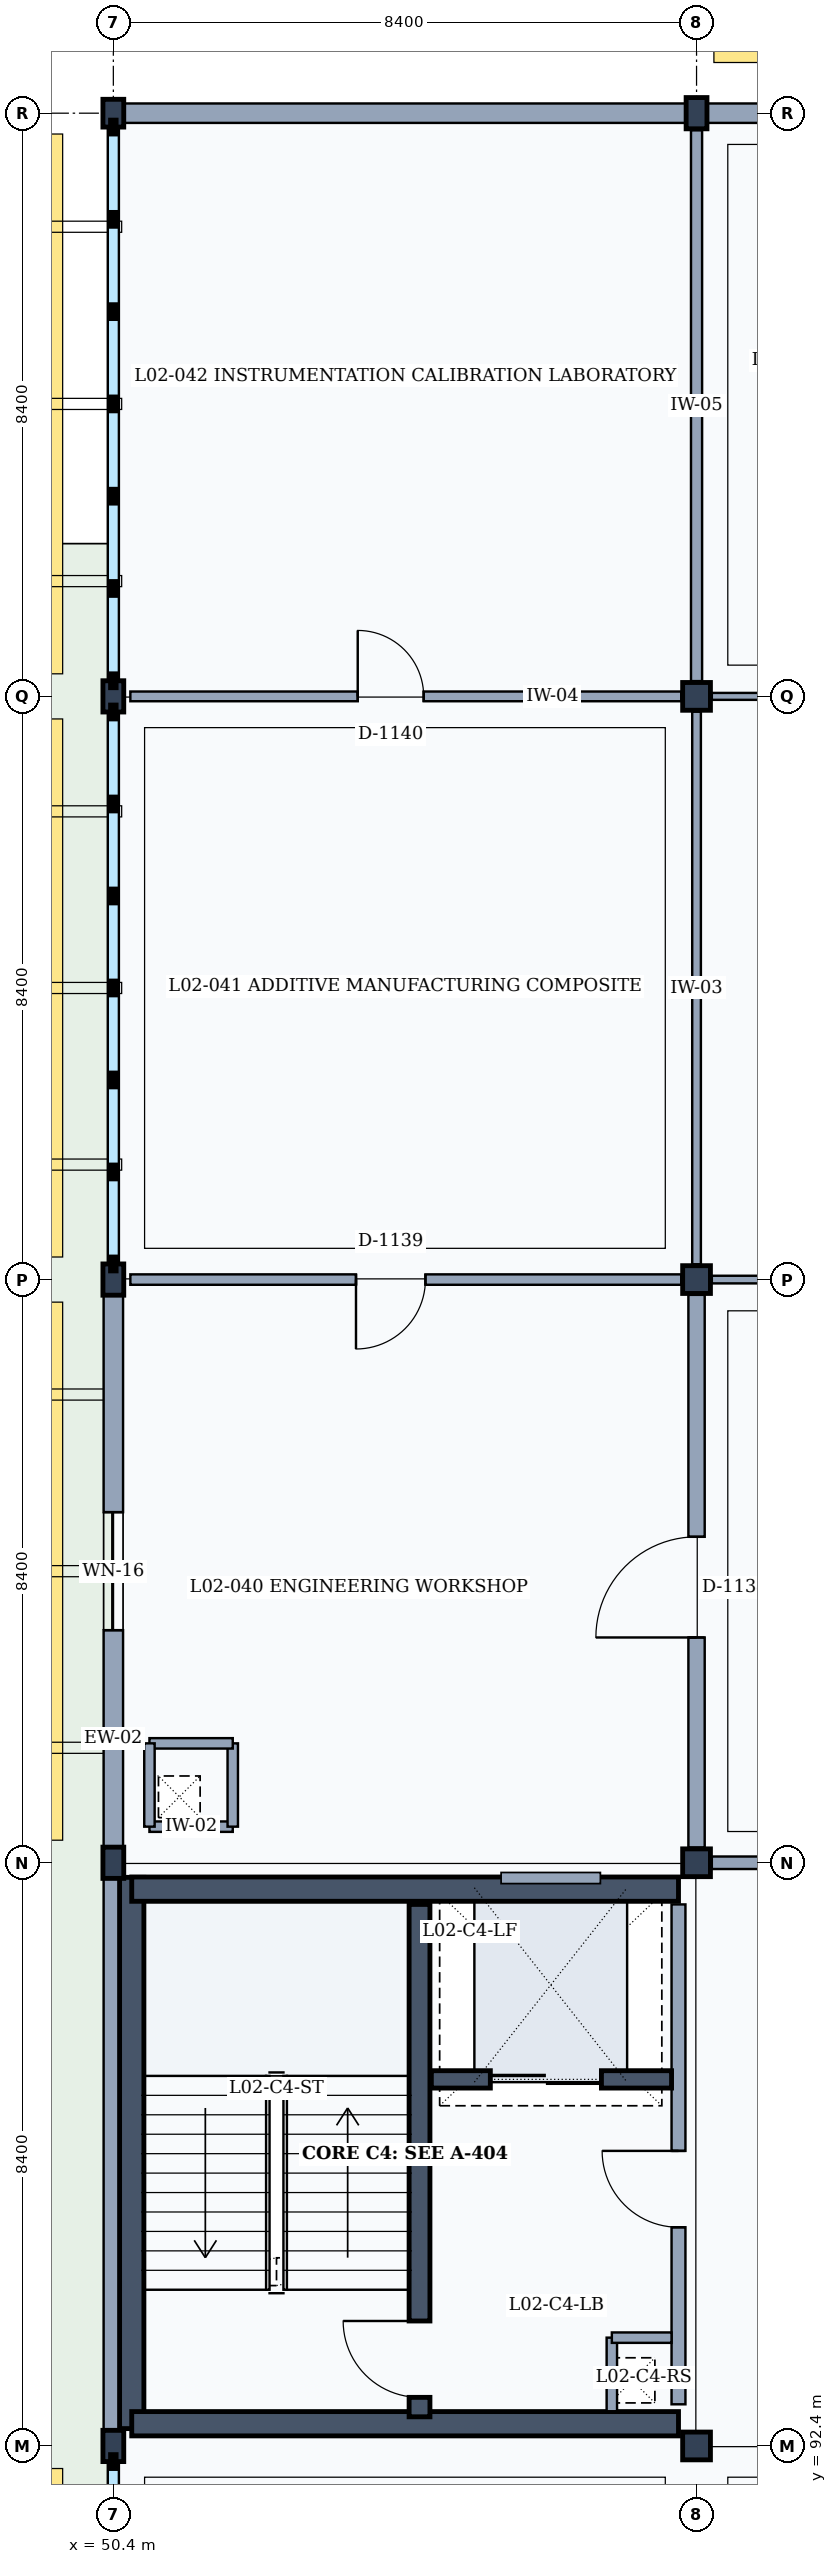
"""IFC4 building model, lengths in metres.
Left out: names, types, materials, properties, quantities, classifications, styles, units other than length and angle.
Written with IfcOpenShell. Run it as: python <this file> out.ifc"""

import sys

from ifc_helpers import new_model, si_unit, direction, frame, frame_2d, origin, origin_2d, place, context, subcontext, project, spatial, rectangle, i_section, extrude, element, fill, save


model = new_model("IFC4")
c1 = context("Model", 3, precision=1e-05, world=origin(), true_north=direction((0.0, 1.0)))
c2 = subcontext(c1, "Body", "Model", "MODEL_VIEW")
j1 = project(units=[si_unit("LENGTHUNIT", "METRE"), si_unit("PLANEANGLEUNIT", "RADIAN")], contexts=[c1])
p1 = place(None, origin())
s1 = spatial("IfcSite", under=j1, at=p1, CompositionType="ELEMENT")
p2 = place(p1, origin())
s2 = spatial("IfcBuilding", under=s1, at=p2, CompositionType="ELEMENT")
p3 = place(p2, frame((0.0, 0.0, 9.6)))
s3 = spatial("IfcBuildingStorey", under=s2, at=p3, CompositionType="ELEMENT", Elevation=9.6)
for number, where, z_axis, x_axis in (
    (1, (50.4, 92.4, 0.0), (0.0, 0.0, 1.0), (1.0, 0.0, 0.0)),
    (2, (50.4, 100.8, 0.0), (0.0, 0.0, 1.0), (1.0, 0.0, 0.0)),
    (3, (50.4, 109.2, 0.0), (0.0, 0.0, 1.0), (1.0, 0.0, 0.0)),
    (4, (50.4, 117.6, 0.0), (0.0, 0.0, 1.0), (1.0, 0.0, 0.0)),
):
    element("IfcColumn", number, at=place(p3, frame(where, z_axis=z_axis, x_axis=x_axis)), inside=s3, PredefinedType="COLUMN", context=c2, shape_type="SweptSolid", body=[
        extrude(i_section(OverallWidth=0.3, OverallDepth=0.45, WebThickness=0.014, FlangeThickness=0.026, FilletRadius=0.027, at=origin_2d()), origin(), (0.0, 0.0, 1.0), 4.2),
    ])
p4 = place(p3, frame((50.4, 126.0, 0.0), z_axis=(0.0, 0.0, 1.0), x_axis=(1.0, 0.0, 0.0)))
e5 = element("IfcColumn", 5, at=p4, inside=s3, PredefinedType="COLUMN", context=c2, shape_type="SweptSolid", body=[
    extrude(i_section(OverallWidth=0.3, OverallDepth=0.4, WebThickness=0.013, FlangeThickness=0.024, FilletRadius=0.027, at=origin_2d()), origin(), (0.0, 0.0, 1.0), 4.2),
])
for number, where, z_axis, x_axis in (
    (6, (58.8, 92.4, 0.0), (0.0, 0.0, 1.0), (1.0, 0.0, 0.0)),
    (7, (58.8, 100.8, 0.0), (0.0, 0.0, 1.0), (1.0, 0.0, 0.0)),
    (8, (58.8, 109.2, 0.0), (0.0, 0.0, 1.0), (1.0, 0.0, 0.0)),
    (9, (58.8, 117.6, 0.0), (0.0, 0.0, 1.0), (1.0, 0.0, 0.0)),
):
    element("IfcColumn", number, at=place(p3, frame(where, z_axis=z_axis, x_axis=x_axis)), inside=s3, PredefinedType="COLUMN", context=c2, shape_type="SweptSolid", body=[
        extrude(rectangle(XDim=0.4, YDim=0.4, at=origin_2d()), origin(), (0.0, 0.0, 1.0), 4.2),
    ])
p5 = place(p3, frame((58.8, 126.0, 0.0), z_axis=(0.0, 0.0, 1.0), x_axis=(1.0, 0.0, 0.0)))
e10 = element("IfcColumn", 10, at=p5, inside=s3, PredefinedType="COLUMN", context=c2, shape_type="SweptSolid", body=[
    extrude(i_section(OverallWidth=0.3, OverallDepth=0.45, WebThickness=0.014, FlangeThickness=0.026, FilletRadius=0.027, at=origin_2d()), origin(), (0.0, 0.0, 1.0), 4.2),
])
p6 = place(p3, frame((50.4, 92.625, 0.0), z_axis=(0.0, 0.0, 1.0), x_axis=(0.0, 1.0, 0.0)))
e11 = element("IfcWall", 11, at=p6, inside=s3, PredefinedType="SOLIDWALL", context=c2, shape_type="SweptSolid", body=[
    extrude(rectangle(XDim=7.95, YDim=0.28, at=frame_2d((3.975, 0.0))), origin(), (0.0, 0.0, 1.0), 3.36),
])
p7 = place(p3, frame((50.4, 101.025, 0.0), z_axis=(0.0, 0.0, 1.0), x_axis=(0.0, 1.0, 0.0)))
e12 = element("IfcWall", 12, at=p7, inside=s3, PredefinedType="SOLIDWALL", context=c2, shape_type="SweptSolid", body=[
    extrude(rectangle(XDim=7.95, YDim=0.28, at=frame_2d((3.975, 0.0))), origin(), (0.0, 0.0, 1.0), 3.36),
])
p8 = place(p7, frame((3.125, 0.0, 0.9)))
e13 = element("IfcOpeningElement", 13, at=p8, cuts=e12, PredefinedType="OPENING", context=c2, shape_type="SweptSolid", body=[
    extrude(rectangle(XDim=1.7, YDim=1.55, at=frame_2d((0.85, 0.775))), frame((0.0, 0.15, 0.0), z_axis=(0.0, -1.0, 0.0), x_axis=(1.0, 0.0, 0.0)), (0.0, 0.0, 1.0), 0.3),
])
p9 = place(p3, frame((50.55, 126.0, 0.0), z_axis=(0.0, 0.0, 1.0), x_axis=(1.0, 0.0, 0.0)))
e14 = element("IfcWall", 14, at=p9, inside=s3, PredefinedType="SOLIDWALL", context=c2, shape_type="SweptSolid", body=[
    extrude(rectangle(XDim=8.1, YDim=0.28, at=frame_2d((4.05, 0.0))), origin(), (0.0, 0.0, 1.0), 3.36),
])
p10 = place(p3, frame((58.95, 126.0, 0.0), z_axis=(0.0, 0.0, 1.0), x_axis=(1.0, 0.0, 0.0)))
e15 = element("IfcWall", 15, at=p10, inside=s3, PredefinedType="SOLIDWALL", context=c2, shape_type="SweptSolid", body=[
    extrude(rectangle(XDim=8.1, YDim=0.28, at=frame_2d((4.05, 0.0))), origin(), (0.0, 0.0, 1.0), 3.36),
])
p11 = place(p10, frame((2.775, 0.0, 0.9)))
e16 = element("IfcOpeningElement", 16, at=p11, cuts=e15, PredefinedType="OPENING", context=c2, shape_type="SweptSolid", body=[
    extrude(rectangle(XDim=2.55, YDim=1.75, at=frame_2d((1.275, 0.875))), frame((0.0, 0.15, 0.0), z_axis=(0.0, -1.0, 0.0), x_axis=(1.0, 0.0, 0.0)), (0.0, 0.0, 1.0), 0.3),
])
p12 = place(p3, frame((50.665, 92.65, 0.0), z_axis=(0.0, 0.0, 1.0), x_axis=(0.0, 1.0, 0.0)))
e17 = element("IfcWall", 17, at=p12, inside=s3, PredefinedType="SHEAR", context=c2, shape_type="SweptSolid", body=[
    extrude(rectangle(XDim=7.94, YDim=0.35, at=frame_2d((3.97, 0.0))), origin(), (0.0, 0.0, 1.0), 3.96),
])
p13 = place(p3, frame((50.665, 100.42, 0.0), z_axis=(0.0, 0.0, 1.0), x_axis=(1.0, 0.0, 0.0)))
e18 = element("IfcWall", 18, at=p13, inside=s3, PredefinedType="SHEAR", context=c2, shape_type="SweptSolid", body=[
    extrude(rectangle(XDim=7.875, YDim=0.35, at=frame_2d((3.938, 0.0))), origin(), (0.0, 0.0, 1.0), 3.96),
])
p14 = place(p3, frame((58.54, 100.2, 0.0), z_axis=(0.0, 0.0, 1.0), x_axis=(0.0, -1.0, 0.0)))
e19 = element("IfcWall", 19, at=p14, inside=s3, PredefinedType="PARTITIONING", context=c2, shape_type="SweptSolid", body=[
    extrude(rectangle(XDim=7.2, YDim=0.2, at=frame_2d((3.6, 0.0))), origin(), (0.0, 0.0, 1.0), 3.32),
])
p15 = place(p14, frame((3.55, 0.0, 0.0)))
e20 = element("IfcOpeningElement", 20, at=p15, cuts=e19, PredefinedType="OPENING", context=c2, shape_type="SweptSolid", body=[
    extrude(rectangle(XDim=1.1, YDim=2.15, at=frame_2d((0.55, 1.075))), frame((0.0, 0.11, 0.0), z_axis=(0.0, -1.0, 0.0), x_axis=(1.0, 0.0, 0.0)), (0.0, 0.0, 1.0), 0.22),
])
p16 = place(p3, frame((58.54, 92.72, 0.0), z_axis=(0.0, 0.0, 1.0), x_axis=(-1.0, 0.0, 0.0)))
e21 = element("IfcWall", 21, at=p16, inside=s3, PredefinedType="SHEAR", context=c2, shape_type="SweptSolid", body=[
    extrude(rectangle(XDim=7.875, YDim=0.35, at=frame_2d((3.938, 0.0))), origin(), (0.0, 0.0, 1.0), 3.96),
])
p17 = place(p3, frame((54.81, 92.82, 0.0), z_axis=(0.0, 0.0, 1.0), x_axis=(0.0, 1.0, 0.0)))
e22 = element("IfcWall", 22, at=p17, inside=s3, PredefinedType="SHEAR", context=c2, shape_type="SweptSolid", body=[
    extrude(rectangle(XDim=7.38, YDim=0.3, at=frame_2d((3.69, 0.0))), origin(), (0.0, 0.0, 1.0), 3.96),
])
p18 = place(p17, frame((0.28, 0.0, 0.0)))
e23 = element("IfcOpeningElement", 23, at=p18, cuts=e22, PredefinedType="OPENING", context=c2, shape_type="SweptSolid", body=[
    extrude(rectangle(XDim=1.1, YDim=2.15, at=frame_2d((0.55, 1.075))), frame((0.0, 0.16, 0.0), z_axis=(0.0, -1.0, 0.0), x_axis=(1.0, 0.0, 0.0)), (0.0, 0.0, 1.0), 0.32),
])
p19 = place(p3, frame((57.58, 93.96, 0.0), z_axis=(0.0, 0.0, 1.0), x_axis=(0.0, -1.0, 0.0)))
e24 = element("IfcWall", 24, at=p19, inside=s3, PredefinedType="PARTITIONING", context=c2, shape_type="SweptSolid", body=[
    extrude(rectangle(XDim=1.06, YDim=0.15, at=frame_2d((0.53, 0.0))), origin(), (0.0, 0.0, 1.0), 3.32),
])
p20 = place(p3, frame((57.58, 93.96, 0.0), z_axis=(0.0, 0.0, 1.0), x_axis=(1.0, 0.0, 0.0)))
e25 = element("IfcWall", 25, at=p20, inside=s3, PredefinedType="PARTITIONING", context=c2, shape_type="SweptSolid", body=[
    extrude(rectangle(XDim=0.86, YDim=0.15, at=frame_2d((0.43, 0.0))), origin(), (0.0, 0.0, 1.0), 3.32),
])
p21 = place(p3, frame((54.98, 97.68, 0.0), z_axis=(0.0, 0.0, 1.0), x_axis=(1.0, 0.0, 0.0)))
e26 = element("IfcWall", 26, at=p21, inside=s3, PredefinedType="SHEAR", context=c2, shape_type="SweptSolid", body=[
    extrude(rectangle(XDim=3.46, YDim=0.25, at=frame_2d((1.73, 0.0))), origin(), (0.0, 0.0, 1.0), 3.96),
])
p22 = place(p21, frame((0.85, 0.0, 0.0)))
e27 = element("IfcOpeningElement", 27, at=p22, cuts=e26, PredefinedType="OPENING", context=c2, shape_type="SweptSolid", body=[
    extrude(rectangle(XDim=1.6, YDim=2.3, at=frame_2d((0.8, 1.15))), frame((0.0, 0.135, 0.0), z_axis=(0.0, -1.0, 0.0), x_axis=(1.0, 0.0, 0.0)), (0.0, 0.0, 1.0), 0.27),
])
p23 = place(p3, frame((50.92, 101.32, 0.0), z_axis=(0.0, 0.0, 1.0), x_axis=(1.0, 0.0, 0.0)))
e28 = element("IfcWall", 28, at=p23, inside=s3, PredefinedType="PARTITIONING", context=c2, shape_type="SweptSolid", body=[
    extrude(rectangle(XDim=1.2, YDim=0.15, at=frame_2d((0.6, 0.0))), origin(), (0.0, 0.0, 1.0), 3.96),
])
p24 = place(p3, frame((52.12, 101.32, 0.0), z_axis=(0.0, 0.0, 1.0), x_axis=(0.0, 1.0, 0.0)))
e29 = element("IfcWall", 29, at=p24, inside=s3, PredefinedType="PARTITIONING", context=c2, shape_type="SweptSolid", body=[
    extrude(rectangle(XDim=1.2, YDim=0.15, at=frame_2d((0.6, 0.0))), origin(), (0.0, 0.0, 1.0), 3.96),
])
p25 = place(p3, frame((52.12, 102.52, 0.0), z_axis=(0.0, 0.0, 1.0), x_axis=(-1.0, 0.0, 0.0)))
e30 = element("IfcWall", 30, at=p25, inside=s3, PredefinedType="PARTITIONING", context=c2, shape_type="SweptSolid", body=[
    extrude(rectangle(XDim=1.2, YDim=0.15, at=frame_2d((0.6, 0.0))), origin(), (0.0, 0.0, 1.0), 3.96),
])
p26 = place(p3, frame((50.92, 102.52, 0.0), z_axis=(0.0, 0.0, 1.0), x_axis=(0.0, -1.0, 0.0)))
e31 = element("IfcWall", 31, at=p26, inside=s3, PredefinedType="PARTITIONING", context=c2, shape_type="SweptSolid", body=[
    extrude(rectangle(XDim=1.2, YDim=0.15, at=frame_2d((0.6, 0.0))), origin(), (0.0, 0.0, 1.0), 3.96),
])
p27 = place(p3, frame((58.8, 101.02, 0.0), z_axis=(0.0, 0.0, 1.0), x_axis=(0.0, 1.0, 0.0)))
e32 = element("IfcWall", 32, at=p27, inside=s3, PredefinedType="PARTITIONING", context=c2, shape_type="SweptSolid", body=[
    extrude(rectangle(XDim=7.96, YDim=0.235, at=frame_2d((3.98, 0.0))), origin(), (0.0, 0.0, 1.0), 3.32),
])
p28 = place(p27, frame((3.025, 0.0, 0.0)))
e33 = element("IfcOpeningElement", 33, at=p28, cuts=e32, PredefinedType="OPENING", context=c2, shape_type="SweptSolid", body=[
    extrude(rectangle(XDim=1.45, YDim=2.35, at=frame_2d((0.725, 1.175))), frame((0.0, 0.127, 0.0), z_axis=(0.0, -1.0, 0.0), x_axis=(1.0, 0.0, 0.0)), (0.0, 0.0, 1.0), 0.255),
])
p29 = place(p3, frame((50.645, 109.2, 0.0), z_axis=(0.0, 0.0, 1.0), x_axis=(1.0, 0.0, 0.0)))
e34 = element("IfcWall", 34, at=p29, inside=s3, PredefinedType="PARTITIONING", context=c2, shape_type="SweptSolid", body=[
    extrude(rectangle(XDim=7.935, YDim=0.15, at=frame_2d((3.968, 0.0))), origin(), (0.0, 0.0, 1.0), 3.32),
])
p30 = place(p29, frame((3.25, 0.0, 0.0)))
e35 = element("IfcOpeningElement", 35, at=p30, cuts=e34, PredefinedType="OPENING", context=c2, shape_type="SweptSolid", body=[
    extrude(rectangle(XDim=1.0, YDim=2.15, at=frame_2d((0.5, 1.075))), frame((0.0, 0.085, 0.0), z_axis=(0.0, -1.0, 0.0), x_axis=(1.0, 0.0, 0.0)), (0.0, 0.0, 1.0), 0.17),
])
p31 = place(p3, frame((58.8, 109.42, 0.0), z_axis=(0.0, 0.0, 1.0), x_axis=(0.0, 1.0, 0.0)))
e36 = element("IfcWall", 36, at=p31, inside=s3, PredefinedType="PARTITIONING", context=c2, shape_type="SweptSolid", body=[
    extrude(rectangle(XDim=7.96, YDim=0.125, at=frame_2d((3.98, 0.0))), origin(), (0.0, 0.0, 1.0), 3.32),
])
p32 = place(p3, frame((50.645, 117.6, 0.0), z_axis=(0.0, 0.0, 1.0), x_axis=(1.0, 0.0, 0.0)))
e37 = element("IfcWall", 37, at=p32, inside=s3, PredefinedType="PARTITIONING", context=c2, shape_type="SweptSolid", body=[
    extrude(rectangle(XDim=7.935, YDim=0.14, at=frame_2d((3.968, 0.0))), origin(), (0.0, 0.0, 1.0), 3.32),
])
p33 = place(p32, frame((3.275, 0.0, 0.0)))
e38 = element("IfcOpeningElement", 38, at=p33, cuts=e37, PredefinedType="OPENING", context=c2, shape_type="SweptSolid", body=[
    extrude(rectangle(XDim=0.95, YDim=2.15, at=frame_2d((0.475, 1.075))), frame((0.0, 0.08, 0.0), z_axis=(0.0, -1.0, 0.0), x_axis=(1.0, 0.0, 0.0)), (0.0, 0.0, 1.0), 0.16),
])
p34 = place(p3, frame((58.8, 117.82, 0.0), z_axis=(0.0, 0.0, 1.0), x_axis=(0.0, 1.0, 0.0)))
e39 = element("IfcWall", 39, at=p34, inside=s3, PredefinedType="PARTITIONING", context=c2, shape_type="SweptSolid", body=[
    extrude(rectangle(XDim=7.935, YDim=0.16, at=frame_2d((3.967, 0.0))), origin(), (0.0, 0.0, 1.0), 3.32),
])
p35 = place(p3, frame((59.02, 100.8, 0.0), z_axis=(0.0, 0.0, 1.0), x_axis=(1.0, 0.0, 0.0)))
e40 = element("IfcWall", 40, at=p35, inside=s3, PredefinedType="PARTITIONING", context=c2, shape_type="SweptSolid", body=[
    extrude(rectangle(XDim=8.035, YDim=0.18, at=frame_2d((4.018, 0.0))), origin(), (0.0, 0.0, 1.0), 3.32),
])
p36 = place(p35, frame((2.85, 0.0, 0.0)))
e41 = element("IfcOpeningElement", 41, at=p36, cuts=e40, PredefinedType="OPENING", context=c2, shape_type="SweptSolid", body=[
    extrude(rectangle(XDim=1.8, YDim=2.3, at=frame_2d((0.9, 1.15))), frame((0.0, 0.1, 0.0), z_axis=(0.0, -1.0, 0.0), x_axis=(1.0, 0.0, 0.0)), (0.0, 0.0, 1.0), 0.2),
])
p37 = place(p3, frame((59.02, 109.2, 0.0), z_axis=(0.0, 0.0, 1.0), x_axis=(1.0, 0.0, 0.0)))
e42 = element("IfcWall", 42, at=p37, inside=s3, PredefinedType="PARTITIONING", context=c2, shape_type="SweptSolid", body=[
    extrude(rectangle(XDim=8.035, YDim=0.11, at=frame_2d((4.018, 0.0))), origin(), (0.0, 0.0, 1.0), 3.32),
])
p38 = place(p37, frame((3.15, 0.0, 0.0)))
e43 = element("IfcOpeningElement", 43, at=p38, cuts=e42, PredefinedType="OPENING", context=c2, shape_type="SweptSolid", body=[
    extrude(rectangle(XDim=1.2, YDim=2.2, at=frame_2d((0.6, 1.1))), frame((0.0, 0.065, 0.0), z_axis=(0.0, -1.0, 0.0), x_axis=(1.0, 0.0, 0.0)), (0.0, 0.0, 1.0), 0.13),
])
p39 = place(p3, frame((59.02, 117.6, 0.0), z_axis=(0.0, 0.0, 1.0), x_axis=(1.0, 0.0, 0.0)))
e44 = element("IfcWall", 44, at=p39, inside=s3, PredefinedType="MOVABLE", context=c2, shape_type="SweptSolid", body=[
    extrude(rectangle(XDim=7.97, YDim=0.1, at=frame_2d((3.985, 0.0))), origin(), (0.0, 0.0, 1.0), 3.32),
])
p40 = place(p39, frame((3.05, 0.0, 0.0)))
e45 = element("IfcOpeningElement", 45, at=p40, cuts=e44, PredefinedType="OPENING", context=c2, shape_type="SweptSolid", body=[
    extrude(rectangle(XDim=1.4, YDim=2.25, at=frame_2d((0.7, 1.125))), frame((0.0, 0.06, 0.0), z_axis=(0.0, -1.0, 0.0), x_axis=(1.0, 0.0, 0.0)), (0.0, 0.0, 1.0), 0.12),
])
p41 = place(p8, origin())
e46 = element("IfcWindow", 46, at=p41, inside=s3, PartitioningType="SINGLE_PANEL", PredefinedType="WINDOW", context=c2, shape_type="SweptSolid", body=[
    extrude(rectangle(XDim=1.7, YDim=1.55, at=frame_2d((0.85, 0.775))), frame((0.0, 0.03, 0.0), z_axis=(0.0, -1.0, 0.0), x_axis=(1.0, 0.0, 0.0)), (0.0, 0.0, 1.0), 0.06),
])
fill(e13, e46)
p42 = place(p15, frame((1.1, 0.0, 0.0), z_axis=(0.0, 0.0, 1.0), x_axis=(-1.0, 0.0, 0.0)))
e47 = element("IfcDoor", 47, at=p42, inside=s3, OperationType="SINGLE_SWING_RIGHT", PredefinedType="DOOR", context=c2, shape_type="SweptSolid", body=[
    extrude(rectangle(XDim=1.1, YDim=2.15, at=frame_2d((0.55, 1.075))), frame((0.0, 0.025, 0.0), z_axis=(0.0, -1.0, 0.0), x_axis=(1.0, 0.0, 0.0)), (0.0, 0.0, 1.0), 0.05),
])
fill(e20, e47)
p43 = place(p18, origin())
e48 = element("IfcDoor", 48, at=p43, inside=s3, OperationType="SINGLE_SWING_RIGHT", PredefinedType="DOOR", context=c2, shape_type="SweptSolid", body=[
    extrude(rectangle(XDim=1.1, YDim=2.15, at=frame_2d((0.55, 1.075))), frame((0.0, 0.025, 0.0), z_axis=(0.0, -1.0, 0.0), x_axis=(1.0, 0.0, 0.0)), (0.0, 0.0, 1.0), 0.05),
])
fill(e23, e48)
p44 = place(p22, origin())
e49 = element("IfcDoor", 49, at=p44, inside=s3, OperationType="DOUBLE_DOOR_SLIDING", PredefinedType="DOOR", context=c2, shape_type="SweptSolid", body=[
    extrude(rectangle(XDim=1.6, YDim=2.3, at=frame_2d((0.8, 1.15))), frame((0.0, 0.025, 0.0), z_axis=(0.0, -1.0, 0.0), x_axis=(1.0, 0.0, 0.0)), (0.0, 0.0, 1.0), 0.05),
])
fill(e27, e49)
p45 = place(p28, origin())
e50 = element("IfcDoor", 50, at=p45, inside=s3, OperationType="SINGLE_SWING_LEFT", PredefinedType="DOOR", context=c2, shape_type="SweptSolid", body=[
    extrude(rectangle(XDim=1.45, YDim=2.35, at=frame_2d((0.725, 1.175))), frame((0.0, 0.025, 0.0), z_axis=(0.0, -1.0, 0.0), x_axis=(1.0, 0.0, 0.0)), (0.0, 0.0, 1.0), 0.05),
])
fill(e33, e50)
p46 = place(p30, frame((1.0, 0.0, 0.0), z_axis=(0.0, 0.0, 1.0), x_axis=(-1.0, 0.0, 0.0)))
e51 = element("IfcDoor", 51, at=p46, inside=s3, OperationType="SINGLE_SWING_RIGHT", PredefinedType="DOOR", context=c2, shape_type="SweptSolid", body=[
    extrude(rectangle(XDim=1.0, YDim=2.15, at=frame_2d((0.5, 1.075))), frame((0.0, 0.025, 0.0), z_axis=(0.0, -1.0, 0.0), x_axis=(1.0, 0.0, 0.0)), (0.0, 0.0, 1.0), 0.05),
])
fill(e35, e51)
p47 = place(p33, origin())
e52 = element("IfcDoor", 52, at=p47, inside=s3, OperationType="SINGLE_SWING_LEFT", PredefinedType="DOOR", context=c2, shape_type="SweptSolid", body=[
    extrude(rectangle(XDim=0.95, YDim=2.15, at=frame_2d((0.475, 1.075))), frame((0.0, 0.025, 0.0), z_axis=(0.0, -1.0, 0.0), x_axis=(1.0, 0.0, 0.0)), (0.0, 0.0, 1.0), 0.05),
])
fill(e38, e52)
save(model, sys.argv[1])
